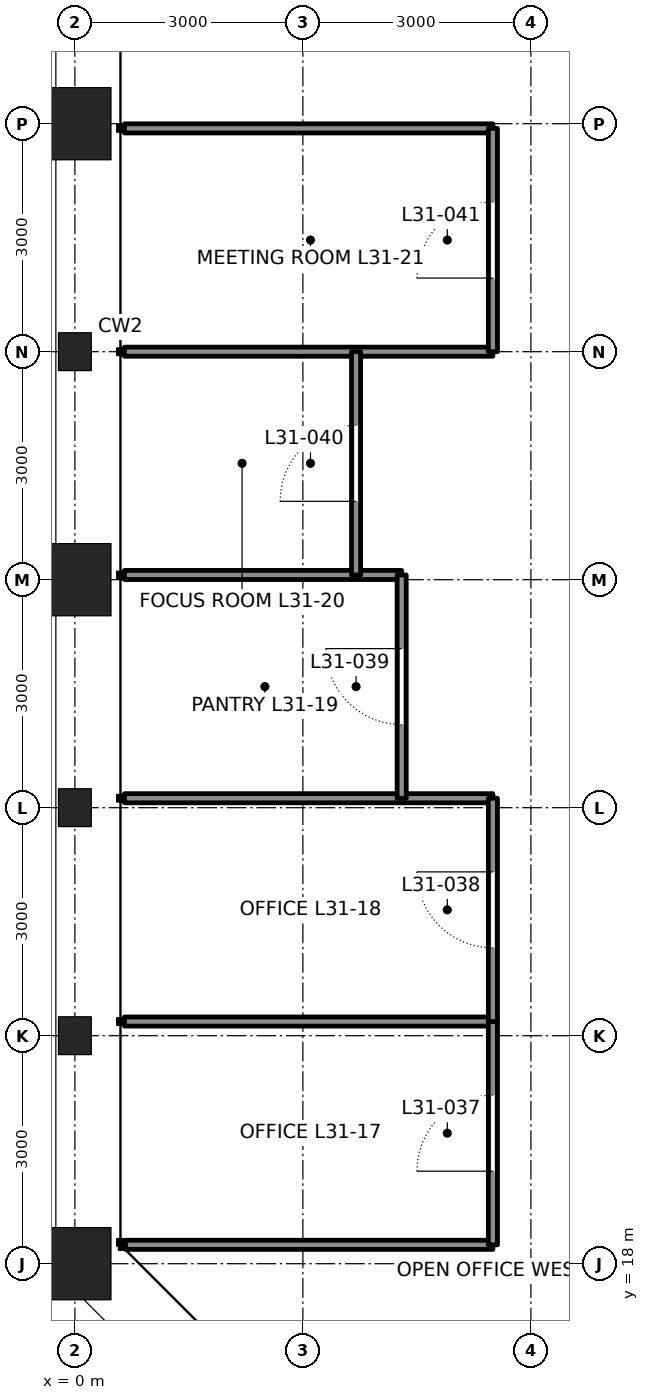
"""IFC4 building model, lengths in metres.
Left out: names, types, materials, properties, quantities, classifications, styles, units other than length and angle.
Written with IfcOpenShell. Run it as: python <this file> out.ifc"""

import sys

from ifc_helpers import new_model, si_unit, direction, frame, frame_2d, origin, origin_2d, place, context, subcontext, project, spatial, rectangle, hollow_rectangle, i_section, extrude, element, fill, save


model = new_model("IFC4")
c1 = context("Model", 3, precision=1e-05, world=origin(), true_north=direction((0.0, 1.0)))
c2 = subcontext(c1, "Body", "Model", "MODEL_VIEW")
j1 = project(units=[si_unit("LENGTHUNIT", "METRE"), si_unit("PLANEANGLEUNIT", "RADIAN")], contexts=[c1])
p1 = place(None, origin())
s1 = spatial("IfcSite", under=j1, at=p1, CompositionType="ELEMENT")
p2 = place(p1, origin())
s2 = spatial("IfcBuilding", under=s1, at=p2, CompositionType="ELEMENT")
p3 = place(p2, frame((0.0, 0.0, 144.6)))
s3 = spatial("IfcBuildingStorey", under=s2, at=p3, CompositionType="ELEMENT", Elevation=144.6)
p4 = place(p3, frame((0.0, 33.0, 0.0), z_axis=(0.0, 0.0, 1.0), x_axis=(-1.0, 0.0, 0.0)))
e1 = element("IfcColumn", 1, at=p4, inside=s3, PredefinedType="COLUMN", context=c2, shape_type="SweptSolid", body=[
    extrude(hollow_rectangle(XDim=0.95, YDim=0.95, WallThickness=0.11, at=origin_2d()), origin(), (0.0, 0.0, 1.0), 4.2),
])
p5 = place(p3, frame((0.0, 30.0, 0.0), z_axis=(0.0, 0.0, 1.0), x_axis=(-1.0, 0.0, 0.0)))
e2 = element("IfcColumn", 2, at=p5, inside=s3, PredefinedType="COLUMN", context=c2, shape_type="SweptSolid", body=[
    extrude(i_section(OverallWidth=0.432, OverallDepth=0.498, WebThickness=0.056, FlangeThickness=0.089, at=origin_2d()), origin(), (0.0, 0.0, 1.0), 4.2),
])
p6 = place(p3, frame((0.0, 27.0, 0.0), z_axis=(0.0, 0.0, 1.0), x_axis=(-1.0, 0.0, 0.0)))
e3 = element("IfcColumn", 3, at=p6, inside=s3, PredefinedType="COLUMN", context=c2, shape_type="SweptSolid", body=[
    extrude(hollow_rectangle(XDim=0.95, YDim=0.95, WallThickness=0.11, at=origin_2d()), origin(), (0.0, 0.0, 1.0), 4.2),
])
for number, where, z_axis, x_axis in (
    (4, (0.0, 24.0, 0.0), (0.0, 0.0, 1.0), (-1.0, 0.0, 0.0)),
    (5, (0.0, 21.0, 0.0), (0.0, 0.0, 1.0), (-1.0, 0.0, 0.0)),
):
    element("IfcColumn", number, at=place(p3, frame(where, z_axis=z_axis, x_axis=x_axis)), inside=s3, PredefinedType="COLUMN", context=c2, shape_type="SweptSolid", body=[
        extrude(i_section(OverallWidth=0.432, OverallDepth=0.498, WebThickness=0.056, FlangeThickness=0.089, at=origin_2d()), origin(), (0.0, 0.0, 1.0), 4.2),
    ])
p7 = place(p3, frame((0.0, 18.0, 0.0), z_axis=(0.0, 0.0, 1.0), x_axis=(-1.0, 0.0, 0.0)))
e6 = element("IfcColumn", 6, at=p7, inside=s3, PredefinedType="COLUMN", context=c2, shape_type="SweptSolid", body=[
    extrude(hollow_rectangle(XDim=0.95, YDim=0.95, WallThickness=0.095, at=origin_2d()), origin(), (0.0, 0.0, 1.0), 4.2),
])
p8 = place(p3, frame((0.666, 18.249, 0.0), z_axis=(0.0, 0.0, 1.0), x_axis=(1.0, 0.0, 0.0)))
e7 = element("IfcWall", 7, at=p8, inside=s3, PredefinedType="PARTITIONING", context=c2, shape_type="SweptSolid", body=[
    extrude(rectangle(XDim=4.834, YDim=0.12, at=frame_2d((2.417, 0.0))), origin(), (0.0, 0.0, 1.0), 4.04),
])
p9 = place(p3, frame((0.653, 21.186, 0.0), z_axis=(0.0, 0.0, 1.0), x_axis=(1.0, 0.0, 0.0)))
e8 = element("IfcWall", 8, at=p9, inside=s3, PredefinedType="PARTITIONING", context=c2, shape_type="SweptSolid", body=[
    extrude(rectangle(XDim=4.847, YDim=0.12, at=frame_2d((2.424, 0.0))), origin(), (0.0, 0.0, 1.0), 4.04),
])
p10 = place(p3, frame((0.653, 24.124, 0.0), z_axis=(0.0, 0.0, 1.0), x_axis=(1.0, 0.0, 0.0)))
e9 = element("IfcWall", 9, at=p10, inside=s3, PredefinedType="PARTITIONING", context=c2, shape_type="SweptSolid", body=[
    extrude(rectangle(XDim=4.847, YDim=0.12, at=frame_2d((2.424, 0.0))), origin(), (0.0, 0.0, 1.0), 3.357),
])
p11 = place(p3, frame((0.653, 27.062, 0.0), z_axis=(0.0, 0.0, 1.0), x_axis=(1.0, 0.0, 0.0)))
e10 = element("IfcWall", 10, at=p11, inside=s3, PredefinedType="PARTITIONING", context=c2, shape_type="SweptSolid", body=[
    extrude(rectangle(XDim=3.647, YDim=0.12, at=frame_2d((1.824, 0.0))), origin(), (0.0, 0.0, 1.0), 3.357),
])
p12 = place(p3, frame((0.653, 30.0, 0.0), z_axis=(0.0, 0.0, 1.0), x_axis=(1.0, 0.0, 0.0)))
e11 = element("IfcWall", 11, at=p12, inside=s3, PredefinedType="PARTITIONING", context=c2, shape_type="SweptSolid", body=[
    extrude(rectangle(XDim=4.847, YDim=0.12, at=frame_2d((2.424, 0.0))), origin(), (0.0, 0.0, 1.0), 3.357),
])
p13 = place(p3, frame((0.653, 32.938, 0.0), z_axis=(0.0, 0.0, 1.0), x_axis=(1.0, 0.0, 0.0)))
e12 = element("IfcWall", 12, at=p13, inside=s3, PredefinedType="PARTITIONING", context=c2, shape_type="SweptSolid", body=[
    extrude(rectangle(XDim=4.847, YDim=0.12, at=frame_2d((2.424, 0.0))), origin(), (0.0, 0.0, 1.0), 3.27),
])
p14 = place(p3, frame((5.5, 18.249, 0.0), z_axis=(0.0, 0.0, 1.0), x_axis=(0.0, 1.0, 0.0)))
e13 = element("IfcWall", 13, at=p14, inside=s3, PredefinedType="PARTITIONING", context=c2, shape_type="SweptSolid", body=[
    extrude(rectangle(XDim=2.938, YDim=0.12, at=frame_2d((1.469, 0.0))), origin(), (0.0, 0.0, 1.0), 4.04),
])
p15 = place(p14, frame((0.969, 0.0, 0.0)))
e14 = element("IfcOpeningElement", 14, at=p15, cuts=e13, PredefinedType="OPENING", context=c2, shape_type="SweptSolid", body=[
    extrude(rectangle(XDim=1.0, YDim=2.4, at=frame_2d((0.5, 1.2))), frame((0.0, 0.07, 0.0), z_axis=(0.0, -1.0, 0.0), x_axis=(1.0, 0.0, 0.0)), (0.0, 0.0, 1.0), 0.14),
])
p16 = place(p3, frame((5.5, 21.186, 0.0), z_axis=(0.0, 0.0, 1.0), x_axis=(0.0, 1.0, 0.0)))
e15 = element("IfcWall", 15, at=p16, inside=s3, PredefinedType="PARTITIONING", context=c2, shape_type="SweptSolid", body=[
    extrude(rectangle(XDim=2.938, YDim=0.12, at=frame_2d((1.469, 0.0))), origin(), (0.0, 0.0, 1.0), 4.04),
])
p17 = place(p16, frame((0.969, 0.0, 0.0)))
e16 = element("IfcOpeningElement", 16, at=p17, cuts=e15, PredefinedType="OPENING", context=c2, shape_type="SweptSolid", body=[
    extrude(rectangle(XDim=1.0, YDim=2.4, at=frame_2d((0.5, 1.2))), frame((0.0, 0.07, 0.0), z_axis=(0.0, -1.0, 0.0), x_axis=(1.0, 0.0, 0.0)), (0.0, 0.0, 1.0), 0.14),
])
p18 = place(p3, frame((4.3, 24.124, 0.0), z_axis=(0.0, 0.0, 1.0), x_axis=(0.0, 1.0, 0.0)))
e17 = element("IfcWall", 17, at=p18, inside=s3, PredefinedType="PARTITIONING", context=c2, shape_type="SweptSolid", body=[
    extrude(rectangle(XDim=2.938, YDim=0.12, at=frame_2d((1.469, 0.0))), origin(), (0.0, 0.0, 1.0), 4.04),
])
p19 = place(p18, frame((0.969, 0.0, 0.0)))
e18 = element("IfcOpeningElement", 18, at=p19, cuts=e17, PredefinedType="OPENING", context=c2, shape_type="SweptSolid", body=[
    extrude(rectangle(XDim=1.0, YDim=2.4, at=frame_2d((0.5, 1.2))), frame((0.0, 0.07, 0.0), z_axis=(0.0, -1.0, 0.0), x_axis=(1.0, 0.0, 0.0)), (0.0, 0.0, 1.0), 0.14),
])
p20 = place(p3, frame((3.7, 27.062, 0.0), z_axis=(0.0, 0.0, 1.0), x_axis=(0.0, 1.0, 0.0)))
e19 = element("IfcWall", 19, at=p20, inside=s3, PredefinedType="PARTITIONING", context=c2, shape_type="SweptSolid", body=[
    extrude(rectangle(XDim=2.938, YDim=0.12, at=frame_2d((1.469, 0.0))), origin(), (0.0, 0.0, 1.0), 4.04),
])
p21 = place(p20, frame((0.969, 0.0, 0.0)))
e20 = element("IfcOpeningElement", 20, at=p21, cuts=e19, PredefinedType="OPENING", context=c2, shape_type="SweptSolid", body=[
    extrude(rectangle(XDim=1.0, YDim=2.4, at=frame_2d((0.5, 1.2))), frame((0.0, 0.07, 0.0), z_axis=(0.0, -1.0, 0.0), x_axis=(1.0, 0.0, 0.0)), (0.0, 0.0, 1.0), 0.14),
])
p22 = place(p3, frame((5.5, 30.0, 0.0), z_axis=(0.0, 0.0, 1.0), x_axis=(0.0, 1.0, 0.0)))
e21 = element("IfcWall", 21, at=p22, inside=s3, PredefinedType="PARTITIONING", context=c2, shape_type="SweptSolid", body=[
    extrude(rectangle(XDim=2.938, YDim=0.12, at=frame_2d((1.469, 0.0))), origin(), (0.0, 0.0, 1.0), 4.04),
])
p23 = place(p22, frame((0.969, 0.0, 0.0)))
e22 = element("IfcOpeningElement", 22, at=p23, cuts=e21, PredefinedType="OPENING", context=c2, shape_type="SweptSolid", body=[
    extrude(rectangle(XDim=1.0, YDim=2.4, at=frame_2d((0.5, 1.2))), frame((0.0, 0.07, 0.0), z_axis=(0.0, -1.0, 0.0), x_axis=(1.0, 0.0, 0.0)), (0.0, 0.0, 1.0), 0.14),
])
p24 = place(p15, origin())
e23 = element("IfcDoor", 23, at=p24, inside=s3, OperationType="SINGLE_SWING_LEFT", PredefinedType="DOOR", context=c2, shape_type="SweptSolid", body=[
    extrude(rectangle(XDim=1.0, YDim=2.4, at=frame_2d((0.5, 1.2))), frame((0.0, 0.025, 0.0), z_axis=(0.0, -1.0, 0.0), x_axis=(1.0, 0.0, 0.0)), (0.0, 0.0, 1.0), 0.05),
])
fill(e14, e23)
p25 = place(p17, origin())
e24 = element("IfcDoor", 24, at=p25, inside=s3, OperationType="SINGLE_SWING_RIGHT", PredefinedType="DOOR", context=c2, shape_type="SweptSolid", body=[
    extrude(rectangle(XDim=1.0, YDim=2.4, at=frame_2d((0.5, 1.2))), frame((0.0, 0.025, 0.0), z_axis=(0.0, -1.0, 0.0), x_axis=(1.0, 0.0, 0.0)), (0.0, 0.0, 1.0), 0.05),
])
fill(e16, e24)
p26 = place(p19, origin())
e25 = element("IfcDoor", 25, at=p26, inside=s3, OperationType="SINGLE_SWING_RIGHT", PredefinedType="DOOR", context=c2, shape_type="SweptSolid", body=[
    extrude(rectangle(XDim=1.0, YDim=2.4, at=frame_2d((0.5, 1.2))), frame((0.0, 0.025, 0.0), z_axis=(0.0, -1.0, 0.0), x_axis=(1.0, 0.0, 0.0)), (0.0, 0.0, 1.0), 0.05),
])
fill(e18, e25)
p27 = place(p21, origin())
e26 = element("IfcDoor", 26, at=p27, inside=s3, OperationType="SINGLE_SWING_LEFT", PredefinedType="DOOR", context=c2, shape_type="SweptSolid", body=[
    extrude(rectangle(XDim=1.0, YDim=2.4, at=frame_2d((0.5, 1.2))), frame((0.0, 0.025, 0.0), z_axis=(0.0, -1.0, 0.0), x_axis=(1.0, 0.0, 0.0)), (0.0, 0.0, 1.0), 0.05),
])
fill(e20, e26)
p28 = place(p23, origin())
e27 = element("IfcDoor", 27, at=p28, inside=s3, OperationType="SINGLE_SWING_LEFT", PredefinedType="DOOR", context=c2, shape_type="SweptSolid", body=[
    extrude(rectangle(XDim=1.0, YDim=2.4, at=frame_2d((0.5, 1.2))), frame((0.0, 0.025, 0.0), z_axis=(0.0, -1.0, 0.0), x_axis=(1.0, 0.0, 0.0)), (0.0, 0.0, 1.0), 0.05),
])
fill(e22, e27)
save(model, sys.argv[1])
